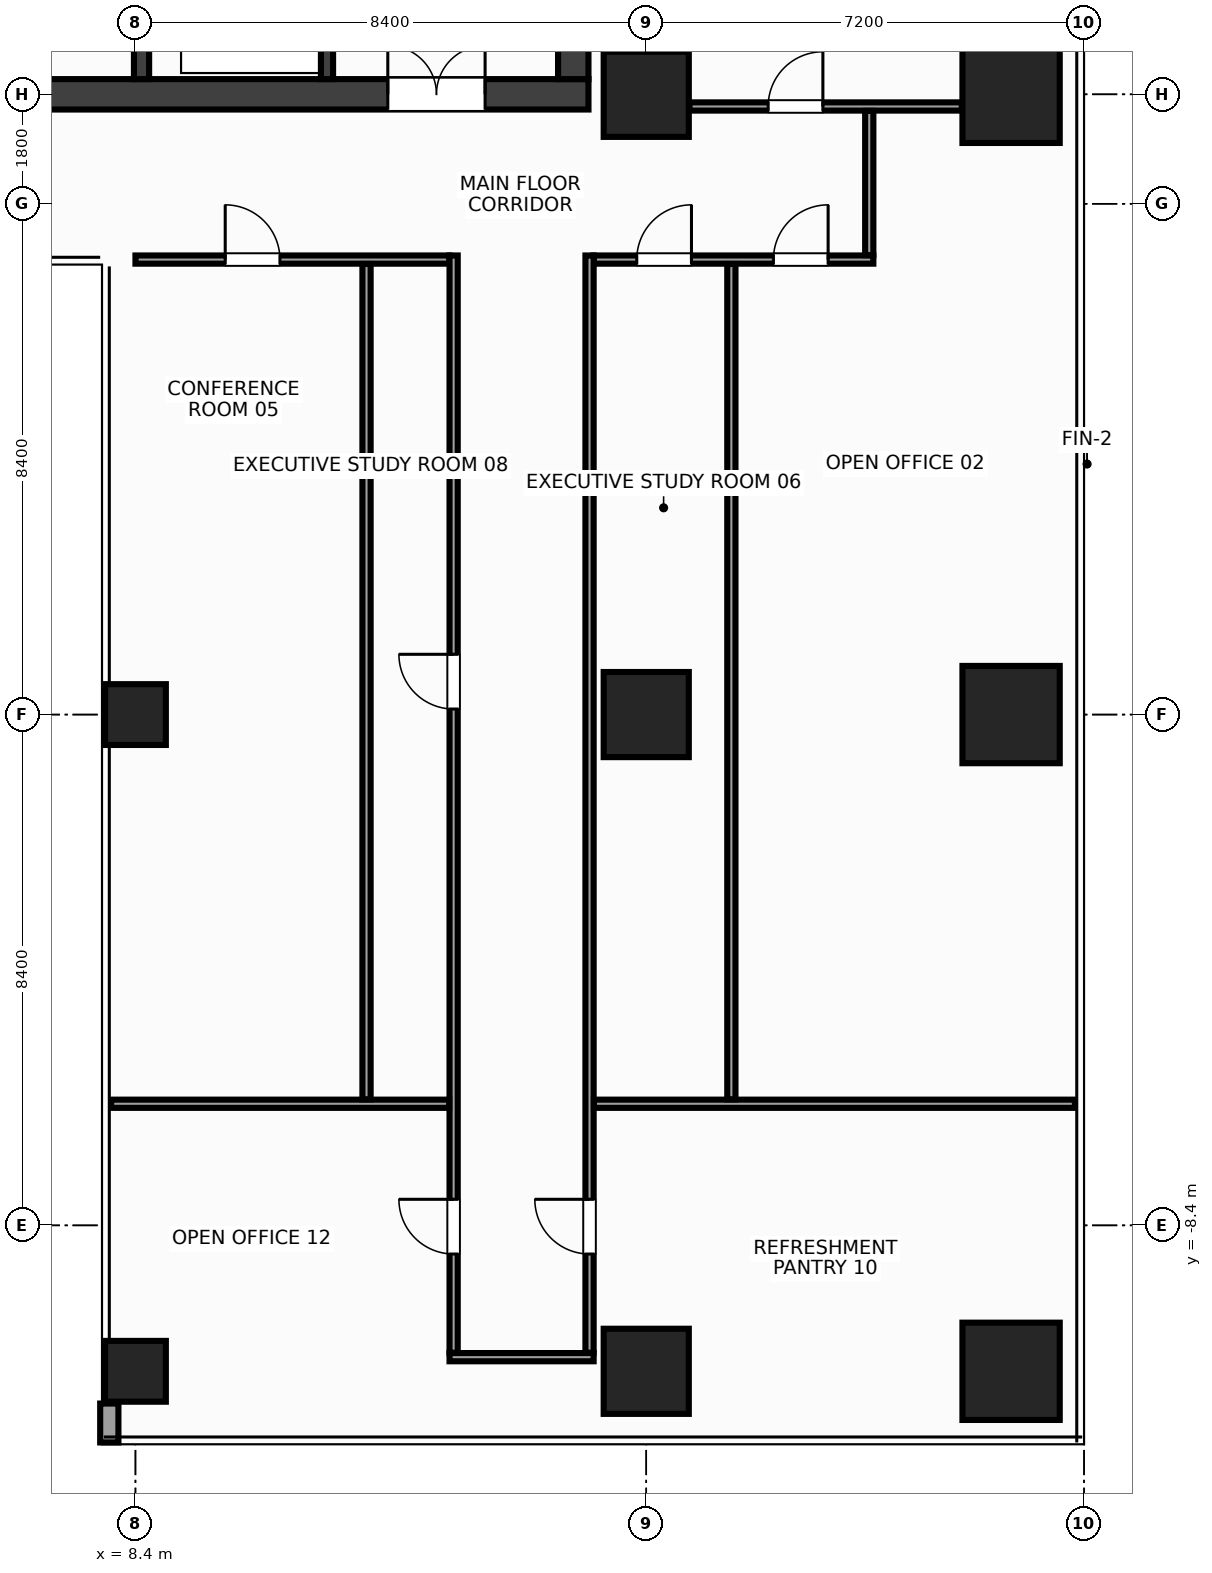
"""IFC4 building model, lengths in metres.
Left out: names, types, materials, properties, quantities, classifications, styles, units other than length and angle.
Written with IfcOpenShell. Run it as: python <this file> out.ifc"""

import sys

from ifc_helpers import new_model, si_unit, direction, frame, frame_2d, origin, origin_2d, place, context, subcontext, project, spatial, rectangle, hollow_rectangle, extrude, source, transform, mapped, element, fill, save


model = new_model("IFC4")
c1 = context("Model", 3, precision=1e-05, world=origin(), true_north=direction((0.0, 1.0)))
c2 = subcontext(c1, "Body", "Model", "MODEL_VIEW")
j1 = project(units=[si_unit("LENGTHUNIT", "METRE"), si_unit("PLANEANGLEUNIT", "RADIAN")], contexts=[c1])
p1 = place(None, origin())
s1 = spatial("IfcSite", under=j1, at=p1, CompositionType="ELEMENT")
p2 = place(p1, origin())
s2 = spatial("IfcBuilding", under=s1, at=p2, CompositionType="ELEMENT")
p3 = place(p2, frame((0.0, 0.0, 203.6)))
s3 = spatial("IfcBuildingStorey", under=s2, at=p3, CompositionType="ELEMENT", Elevation=203.6)
m1 = source(origin(), c2, "Body", "SweptSolid", [
    extrude(rectangle(XDim=31.7, YDim=0.5, at=frame_2d((15.85, 0.0))), origin(), (0.0, 0.0, 1.0), 3.6),
])
p4 = place(p3, frame((-15.85, 10.2, 0.0), z_axis=(0.0, 0.0, 1.0), x_axis=(1.0, 0.0, 0.0)))
e1 = element("IfcWall", 1, at=p4, inside=s3, PredefinedType="SHEAR", context=c2, shape_type="MappedRepresentation", body=[
    mapped(m1, transform((0.0, 0.0, 0.0), x_axis=(1.0, 0.0, 0.0), y_axis=(0.0, 1.0, 0.0), z_axis=(0.0, 0.0, 1.0), scale=1.0)),
])
p5 = place(p4, frame((1.7, 0.0, 0.0)))
e2 = element("IfcOpeningElement", 2, at=p5, cuts=e1, PredefinedType="OPENING", context=c2, shape_type="SweptSolid", body=[
    extrude(rectangle(XDim=1.6, YDim=2.15, at=frame_2d((0.8, 1.075))), frame((0.0, 0.262, 0.0), z_axis=(0.0, -1.0, 0.0), x_axis=(1.0, 0.0, 0.0)), (0.0, 0.0, 1.0), 0.524),
])
p6 = place(p4, frame((28.4, 0.0, 0.0)))
e3 = element("IfcOpeningElement", 3, at=p6, cuts=e1, PredefinedType="OPENING", context=c2, shape_type="SweptSolid", body=[
    extrude(rectangle(XDim=1.6, YDim=2.15, at=frame_2d((0.8, 1.075))), frame((0.0, 0.262, 0.0), z_axis=(0.0, -1.0, 0.0), x_axis=(1.0, 0.0, 0.0)), (0.0, 0.0, 1.0), 0.524),
])
p7 = place(p4, frame((15.1, 0.0, 0.0)))
e4 = element("IfcOpeningElement", 4, at=p7, cuts=e1, PredefinedType="OPENING", context=c2, shape_type="SweptSolid", body=[
    extrude(rectangle(XDim=1.5, YDim=2.2, at=frame_2d((0.75, 1.1))), frame((0.0, 0.262, 0.0), z_axis=(0.0, -1.0, 0.0), x_axis=(1.0, 0.0, 0.0)), (0.0, 0.0, 1.0), 0.524),
])
m2 = source(origin(), c2, "Body", "SweptSolid", [
    extrude(rectangle(XDim=13.1, YDim=0.5, at=frame_2d((6.55, 0.0))), origin(), (0.0, 0.0, 1.0), 3.6),
])
p8 = place(p3, frame((15.6, 10.45, 0.0), z_axis=(0.0, 0.0, 1.0), x_axis=(0.0, 1.0, 0.0)))
e5 = element("IfcWall", 5, at=p8, inside=s3, PredefinedType="SHEAR", context=c2, shape_type="MappedRepresentation", body=[
    mapped(m2, transform((0.0, 0.0, 0.0), x_axis=(1.0, 0.0, 0.0), y_axis=(0.0, 1.0, 0.0), z_axis=(0.0, 0.0, 1.0), scale=1.0)),
])
m3 = source(origin(), c2, "Body", "SweptSolid", [
    extrude(rectangle(XDim=13.1, YDim=0.25, at=frame_2d((6.55, 0.0))), origin(), (0.0, 0.0, 1.0), 3.6),
])
p9 = place(p3, frame((8.5, 10.45, 0.0), z_axis=(0.0, 0.0, 1.0), x_axis=(0.0, 1.0, 0.0)))
e6 = element("IfcWall", 6, at=p9, inside=s3, PredefinedType="SHEAR", context=c2, shape_type="MappedRepresentation", body=[
    mapped(m3, transform((0.0, 0.0, 0.0), x_axis=(1.0, 0.0, 0.0), y_axis=(0.0, 1.0, 0.0), z_axis=(0.0, 0.0, 1.0), scale=1.0)),
])
p10 = place(p9, frame((10.0, 0.0, 0.0)))
e7 = element("IfcOpeningElement", 7, at=p10, cuts=e6, PredefinedType="OPENING", context=c2, shape_type="SweptSolid", body=[
    extrude(rectangle(XDim=0.95, YDim=2.15, at=frame_2d((0.475, 1.075))), frame((0.0, 0.137, 0.0), z_axis=(0.0, -1.0, 0.0), x_axis=(1.0, 0.0, 0.0)), (0.0, 0.0, 1.0), 0.274),
])
m4 = source(origin(), c2, "Body", "SweptSolid", [
    extrude(rectangle(XDim=3.2, YDim=0.2, at=frame_2d((1.6, 0.0))), origin(), (0.0, 0.0, 1.0), 3.6),
])
p11 = place(p3, frame((11.55, 10.45, 0.0), z_axis=(0.0, 0.0, 1.0), x_axis=(0.0, 1.0, 0.0)))
e8 = element("IfcWall", 8, at=p11, inside=s3, PredefinedType="SHEAR", context=c2, shape_type="MappedRepresentation", body=[
    mapped(m4, transform((0.0, 0.0, 0.0), x_axis=(1.0, 0.0, 0.0), y_axis=(0.0, 1.0, 0.0), z_axis=(0.0, 0.0, 1.0), scale=1.0)),
])
p12 = place(p11, frame((0.9, 0.0, 0.0)))
e9 = element("IfcOpeningElement", 9, at=p12, cuts=e8, PredefinedType="OPENING", context=c2, shape_type="SweptSolid", body=[
    extrude(rectangle(XDim=1.1, YDim=2.15, at=frame_2d((0.55, 1.075))), frame((0.0, 0.112, 0.0), z_axis=(0.0, -1.0, 0.0), x_axis=(1.0, 0.0, 0.0)), (0.0, 0.0, 1.0), 0.224),
])
m5 = source(origin(), c2, "Body", "SweptSolid", [
    extrude(rectangle(XDim=1.4, YDim=1.4, at=origin_2d()), origin(), (0.0, 0.0, 1.0), 3.6),
])
for number, where, z_axis, x_axis in (
    (10, (16.8, -10.8, 0.0), (0.0, 0.0, 1.0), (1.0, 0.0, 0.0)),
    (11, (16.8, 0.0, 0.0), (0.0, 0.0, 1.0), (1.0, 0.0, 0.0)),
    (12, (16.8, 10.2, 0.0), (0.0, 0.0, 1.0), (1.0, 0.0, 0.0)),
):
    element("IfcColumn", number, at=place(p3, frame(where, z_axis=z_axis, x_axis=x_axis)), inside=s3, PredefinedType="COLUMN", context=c2, shape_type="MappedRepresentation", body=[
        mapped(m5, transform((0.0, 0.0, 0.0), x_axis=(1.0, 0.0, 0.0), y_axis=(0.0, 1.0, 0.0), z_axis=(0.0, 0.0, 1.0), scale=1.0)),
    ])
m6 = source(origin(), c2, "Body", "SweptSolid", [
    extrude(rectangle(XDim=1.6, YDim=1.6, at=origin_2d()), origin(), (0.0, 0.0, 1.0), 3.6),
])
for number, where, z_axis, x_axis in (
    (13, (22.8, -10.8, 0.0), (0.0, 0.0, 1.0), (1.0, 0.0, 0.0)),
    (14, (22.8, 0.0, 0.0), (0.0, 0.0, 1.0), (1.0, 0.0, 0.0)),
    (15, (22.8, 10.2, 0.0), (0.0, 0.0, 1.0), (1.0, 0.0, 0.0)),
):
    element("IfcColumn", number, at=place(p3, frame(where, z_axis=z_axis, x_axis=x_axis)), inside=s3, PredefinedType="COLUMN", context=c2, shape_type="MappedRepresentation", body=[
        mapped(m6, transform((0.0, 0.0, 0.0), x_axis=(1.0, 0.0, 0.0), y_axis=(0.0, 1.0, 0.0), z_axis=(0.0, 0.0, 1.0), scale=1.0)),
    ])
m7 = source(origin(), c2, "Body", "SweptSolid", [
    extrude(hollow_rectangle(XDim=1.0, YDim=1.0, WallThickness=0.045, at=origin_2d()), origin(), (0.0, 0.0, 1.0), 3.6),
])
for number, where, z_axis, x_axis in (
    (16, (8.4, 0.0, 0.0), (0.0, 0.0, 1.0), (1.0, 0.0, 0.0)),
    (17, (8.4, -10.8, 0.0), (0.0, 0.0, 1.0), (1.0, 0.0, 0.0)),
):
    element("IfcColumn", number, at=place(p3, frame(where, z_axis=z_axis, x_axis=x_axis)), inside=s3, PredefinedType="COLUMN", context=c2, shape_type="MappedRepresentation", body=[
        mapped(m7, transform((0.0, 0.0, 0.0), x_axis=(1.0, 0.0, 0.0), y_axis=(0.0, 1.0, 0.0), z_axis=(0.0, 0.0, 1.0), scale=1.0)),
    ])
m8 = source(origin(), c2, "Body", "SweptSolid", [
    extrude(rectangle(XDim=0.64, YDim=0.24, at=frame_2d((0.32, 0.0))), origin(), (0.0, 0.0, 1.0), 2.76),
])
p13 = place(p3, frame((7.97, -11.33, 0.0), z_axis=(0.0, 0.0, 1.0), x_axis=(0.0, -1.0, 0.0)))
e18 = element("IfcWall", 18, at=p13, inside=s3, PredefinedType="STANDARD", context=c2, shape_type="MappedRepresentation", body=[
    mapped(m8, transform((0.0, 0.0, 0.0), x_axis=(1.0, 0.0, 0.0), y_axis=(0.0, 1.0, 0.0), z_axis=(0.0, 0.0, 1.0), scale=1.0)),
])
m9 = source(origin(), c2, "Body", "SweptSolid", [
    extrude(rectangle(XDim=4.48, YDim=0.135, at=frame_2d((2.24, 0.0))), origin(), (0.0, 0.0, 1.0), 2.915),
])
p14 = place(p3, frame((17.51, 10.0, 0.0), z_axis=(0.0, 0.0, 1.0), x_axis=(1.0, 0.0, 0.0)))
e19 = element("IfcWall", 19, at=p14, inside=s3, PredefinedType="PARTITIONING", context=c2, shape_type="MappedRepresentation", body=[
    mapped(m9, transform((0.0, 0.0, 0.0), x_axis=(1.0, 0.0, 0.0), y_axis=(0.0, 1.0, 0.0), z_axis=(0.0, 0.0, 1.0), scale=1.0)),
])
p15 = place(p14, frame((1.295, 0.0, 0.0)))
e20 = element("IfcOpeningElement", 20, at=p15, cuts=e19, PredefinedType="OPENING", context=c2, shape_type="SweptSolid", body=[
    extrude(rectangle(XDim=0.9, YDim=2.15, at=frame_2d((0.45, 1.075))), frame((0.0, 0.08, 0.0), z_axis=(0.0, -1.0, 0.0), x_axis=(1.0, 0.0, 0.0)), (0.0, 0.0, 1.0), 0.159),
])
m10 = source(origin(), c2, "Body", "SweptSolid", [
    extrude(rectangle(XDim=5.165, YDim=0.135, at=frame_2d((2.583, 0.0))), origin(), (0.0, 0.0, 1.0), 3.38),
])
p16 = place(p3, frame((8.4, 7.482, 0.0), z_axis=(0.0, 0.0, 1.0), x_axis=(1.0, 0.0, 0.0)))
e21 = element("IfcWall", 21, at=p16, inside=s3, PredefinedType="PARTITIONING", context=c2, shape_type="MappedRepresentation", body=[
    mapped(m10, transform((0.0, 0.0, 0.0), x_axis=(1.0, 0.0, 0.0), y_axis=(0.0, 1.0, 0.0), z_axis=(0.0, 0.0, 1.0), scale=1.0)),
])
p17 = place(p16, frame((1.476, 0.0, 0.0)))
e22 = element("IfcOpeningElement", 22, at=p17, cuts=e21, PredefinedType="OPENING", context=c2, shape_type="SweptSolid", body=[
    extrude(rectangle(XDim=0.9, YDim=2.15, at=frame_2d((0.45, 1.075))), frame((0.0, 0.08, 0.0), z_axis=(0.0, -1.0, 0.0), x_axis=(1.0, 0.0, 0.0)), (0.0, 0.0, 1.0), 0.159),
])
m11 = source(origin(), c2, "Body", "SweptSolid", [
    extrude(rectangle(XDim=4.6, YDim=0.135, at=frame_2d((2.3, 0.0))), origin(), (0.0, 0.0, 1.0), 2.765),
])
p18 = place(p3, frame((15.935, 7.482, 0.0), z_axis=(0.0, 0.0, 1.0), x_axis=(1.0, 0.0, 0.0)))
e23 = element("IfcWall", 23, at=p18, inside=s3, PredefinedType="PARTITIONING", context=c2, shape_type="MappedRepresentation", body=[
    mapped(m11, transform((0.0, 0.0, 0.0), x_axis=(1.0, 0.0, 0.0), y_axis=(0.0, 1.0, 0.0), z_axis=(0.0, 0.0, 1.0), scale=1.0)),
])
p19 = place(p18, frame((2.956, 0.0, 0.0)))
e24 = element("IfcOpeningElement", 24, at=p19, cuts=e23, PredefinedType="OPENING", context=c2, shape_type="SweptSolid", body=[
    extrude(rectangle(XDim=0.9, YDim=2.15, at=frame_2d((0.45, 1.075))), frame((0.0, 0.08, 0.0), z_axis=(0.0, -1.0, 0.0), x_axis=(1.0, 0.0, 0.0)), (0.0, 0.0, 1.0), 0.159),
])
p20 = place(p18, frame((0.709, 0.0, 0.0)))
e25 = element("IfcOpeningElement", 25, at=p20, cuts=e23, PredefinedType="OPENING", context=c2, shape_type="SweptSolid", body=[
    extrude(rectangle(XDim=0.9, YDim=2.15, at=frame_2d((0.45, 1.075))), frame((0.0, 0.08, 0.0), z_axis=(0.0, -1.0, 0.0), x_axis=(1.0, 0.0, 0.0)), (0.0, 0.0, 1.0), 0.159),
])
m12 = source(origin(), c2, "Body", "SweptSolid", [
    extrude(rectangle(XDim=2.37, YDim=0.135, at=frame_2d((1.185, 0.0))), origin(), (0.0, 0.0, 1.0), 3.38),
])
p21 = place(p3, frame((13.565, -10.567, 0.0), z_axis=(0.0, 0.0, 1.0), x_axis=(1.0, 0.0, 0.0)))
e26 = element("IfcWall", 26, at=p21, inside=s3, PredefinedType="PARTITIONING", context=c2, shape_type="MappedRepresentation", body=[
    mapped(m12, transform((0.0, 0.0, 0.0), x_axis=(1.0, 0.0, 0.0), y_axis=(0.0, 1.0, 0.0), z_axis=(0.0, 0.0, 1.0), scale=1.0)),
])
m13 = source(origin(), c2, "Body", "SweptSolid", [
    extrude(rectangle(XDim=2.373, YDim=0.135, at=frame_2d((1.186, 0.0))), origin(), (0.0, 0.0, 1.0), 3.38),
])
p22 = place(p3, frame((20.468, 7.555, 0.0), z_axis=(0.0, 0.0, 1.0), x_axis=(0.0, 1.0, 0.0)))
e27 = element("IfcWall", 27, at=p22, inside=s3, PredefinedType="PARTITIONING", context=c2, shape_type="MappedRepresentation", body=[
    mapped(m13, transform((0.0, 0.0, 0.0), x_axis=(1.0, 0.0, 0.0), y_axis=(0.0, 1.0, 0.0), z_axis=(0.0, 0.0, 1.0), scale=1.0)),
])
m14 = source(origin(), c2, "Body", "SweptSolid", [
    extrude(rectangle(XDim=18.045, YDim=0.135, at=frame_2d((9.022, 0.0))), origin(), (0.0, 0.0, 1.0), 2.915),
])
p23 = place(p3, frame((13.633, -10.495, 0.0), z_axis=(0.0, 0.0, 1.0), x_axis=(0.0, 1.0, 0.0)))
e28 = element("IfcWall", 28, at=p23, inside=s3, PredefinedType="PARTITIONING", context=c2, shape_type="MappedRepresentation", body=[
    mapped(m14, transform((0.0, 0.0, 0.0), x_axis=(1.0, 0.0, 0.0), y_axis=(0.0, 1.0, 0.0), z_axis=(0.0, 0.0, 1.0), scale=1.0)),
])
p24 = place(p23, frame((10.586, 0.0, 0.0)))
e29 = element("IfcOpeningElement", 29, at=p24, cuts=e28, PredefinedType="OPENING", context=c2, shape_type="SweptSolid", body=[
    extrude(rectangle(XDim=0.9, YDim=2.15, at=frame_2d((0.45, 1.075))), frame((0.0, 0.08, 0.0), z_axis=(0.0, -1.0, 0.0), x_axis=(1.0, 0.0, 0.0)), (0.0, 0.0, 1.0), 0.159),
])
p25 = place(p23, frame((1.624, 0.0, 0.0)))
e30 = element("IfcOpeningElement", 30, at=p25, cuts=e28, PredefinedType="OPENING", context=c2, shape_type="SweptSolid", body=[
    extrude(rectangle(XDim=0.9, YDim=2.15, at=frame_2d((0.45, 1.075))), frame((0.0, 0.08, 0.0), z_axis=(0.0, -1.0, 0.0), x_axis=(1.0, 0.0, 0.0)), (0.0, 0.0, 1.0), 0.159),
])
p26 = place(p3, frame((15.867, -10.495, 0.0), z_axis=(0.0, 0.0, 1.0), x_axis=(0.0, 1.0, 0.0)))
e31 = element("IfcWall", 31, at=p26, inside=s3, PredefinedType="PARTITIONING", context=c2, shape_type="MappedRepresentation", body=[
    mapped(m14, transform((0.0, 0.0, 0.0), x_axis=(1.0, 0.0, 0.0), y_axis=(0.0, 1.0, 0.0), z_axis=(0.0, 0.0, 1.0), scale=1.0)),
])
p27 = place(p26, frame((1.624, 0.0, 0.0)))
e32 = element("IfcOpeningElement", 32, at=p27, cuts=e31, PredefinedType="OPENING", context=c2, shape_type="SweptSolid", body=[
    extrude(rectangle(XDim=0.9, YDim=2.15, at=frame_2d((0.45, 1.075))), frame((0.0, 0.08, 0.0), z_axis=(0.0, -1.0, 0.0), x_axis=(1.0, 0.0, 0.0)), (0.0, 0.0, 1.0), 0.159),
])
m15 = source(origin(), c2, "Body", "SweptSolid", [
    extrude(rectangle(XDim=5.56, YDim=0.135, at=frame_2d((2.78, 0.0))), origin(), (0.0, 0.0, 1.0), 2.765),
])
p28 = place(p3, frame((8.0, -6.4, 0.0), z_axis=(0.0, 0.0, 1.0), x_axis=(1.0, 0.0, 0.0)))
e33 = element("IfcWall", 33, at=p28, inside=s3, PredefinedType="PARTITIONING", context=c2, shape_type="MappedRepresentation", body=[
    mapped(m15, transform((0.0, 0.0, 0.0), x_axis=(1.0, 0.0, 0.0), y_axis=(0.0, 1.0, 0.0), z_axis=(0.0, 0.0, 1.0), scale=1.0)),
])
m16 = source(origin(), c2, "Body", "SweptSolid", [
    extrude(rectangle(XDim=7.91, YDim=0.135, at=frame_2d((3.955, 0.0))), origin(), (0.0, 0.0, 1.0), 2.765),
])
p29 = place(p3, frame((15.94, -6.4, 0.0), z_axis=(0.0, 0.0, 1.0), x_axis=(1.0, 0.0, 0.0)))
e34 = element("IfcWall", 34, at=p29, inside=s3, PredefinedType="PARTITIONING", context=c2, shape_type="MappedRepresentation", body=[
    mapped(m16, transform((0.0, 0.0, 0.0), x_axis=(1.0, 0.0, 0.0), y_axis=(0.0, 1.0, 0.0), z_axis=(0.0, 0.0, 1.0), scale=1.0)),
])
m17 = source(origin(), c2, "Body", "SweptSolid", [
    extrude(rectangle(XDim=13.737, YDim=0.135, at=frame_2d((6.869, 0.0))), origin(), (0.0, 0.0, 1.0), 2.915),
])
for number, where, z_axis, x_axis in (
    (35, (12.2, -6.327, 0.0), (0.0, 0.0, 1.0), (0.0, 1.0, 0.0)),
    (36, (18.2, -6.327, 0.0), (0.0, 0.0, 1.0), (0.0, 1.0, 0.0)),
):
    element("IfcWall", number, at=place(p3, frame(where, z_axis=z_axis, x_axis=x_axis)), inside=s3, PredefinedType="PARTITIONING", context=c2, shape_type="MappedRepresentation", body=[
        mapped(m17, transform((0.0, 0.0, 0.0), x_axis=(1.0, 0.0, 0.0), y_axis=(0.0, 1.0, 0.0), z_axis=(0.0, 0.0, 1.0), scale=1.0)),
    ])
m18 = source(origin(), c2, "Body", "SweptSolid", [
    extrude(rectangle(XDim=1.6, YDim=2.15, at=frame_2d((0.8, 1.075))), frame((0.0, 0.025, 0.0), z_axis=(0.0, -1.0, 0.0), x_axis=(1.0, 0.0, 0.0)), (0.0, 0.0, 1.0), 0.05),
])
p30 = place(p6, origin())
e37 = element("IfcDoor", 37, at=p30, inside=s3, OperationType="DOUBLE_DOOR_SINGLE_SWING", PredefinedType="DOOR", context=c2, shape_type="MappedRepresentation", body=[
    mapped(m18, transform((0.0, 0.0, 0.0), x_axis=(1.0, 0.0, 0.0), y_axis=(0.0, 1.0, 0.0), z_axis=(0.0, 0.0, 1.0), scale=1.0)),
])
fill(e3, e37)
m19 = source(origin(), c2, "Body", "SweptSolid", [
    extrude(rectangle(XDim=0.9, YDim=2.15, at=frame_2d((0.45, 1.075))), frame((0.0, 0.025, 0.0), z_axis=(0.0, -1.0, 0.0), x_axis=(1.0, 0.0, 0.0)), (0.0, 0.0, 1.0), 0.05),
])
p31 = place(p15, origin())
e38 = element("IfcDoor", 38, at=p31, inside=s3, OperationType="SINGLE_SWING_RIGHT", PredefinedType="DOOR", context=c2, shape_type="MappedRepresentation", body=[
    mapped(m19, transform((0.0, 0.0, 0.0), x_axis=(1.0, 0.0, 0.0), y_axis=(0.0, 1.0, 0.0), z_axis=(0.0, 0.0, 1.0), scale=1.0)),
])
fill(e20, e38)
p32 = place(p19, origin())
e39 = element("IfcDoor", 39, at=p32, inside=s3, OperationType="SINGLE_SWING_RIGHT", PredefinedType="DOOR", context=c2, shape_type="MappedRepresentation", body=[
    mapped(m19, transform((0.0, 0.0, 0.0), x_axis=(1.0, 0.0, 0.0), y_axis=(0.0, 1.0, 0.0), z_axis=(0.0, 0.0, 1.0), scale=1.0)),
])
fill(e24, e39)
p33 = place(p17, origin())
e40 = element("IfcDoor", 40, at=p33, inside=s3, OperationType="SINGLE_SWING_LEFT", PredefinedType="DOOR", context=c2, shape_type="MappedRepresentation", body=[
    mapped(m19, transform((0.0, 0.0, 0.0), x_axis=(1.0, 0.0, 0.0), y_axis=(0.0, 1.0, 0.0), z_axis=(0.0, 0.0, 1.0), scale=1.0)),
])
fill(e22, e40)
p34 = place(p20, origin())
e41 = element("IfcDoor", 41, at=p34, inside=s3, OperationType="SINGLE_SWING_RIGHT", PredefinedType="DOOR", context=c2, shape_type="MappedRepresentation", body=[
    mapped(m19, transform((0.0, 0.0, 0.0), x_axis=(1.0, 0.0, 0.0), y_axis=(0.0, 1.0, 0.0), z_axis=(0.0, 0.0, 1.0), scale=1.0)),
])
fill(e25, e41)
p35 = place(p24, origin())
e42 = element("IfcDoor", 42, at=p35, inside=s3, OperationType="SINGLE_SWING_RIGHT", PredefinedType="DOOR", context=c2, shape_type="MappedRepresentation", body=[
    mapped(m19, transform((0.0, 0.0, 0.0), x_axis=(1.0, 0.0, 0.0), y_axis=(0.0, 1.0, 0.0), z_axis=(0.0, 0.0, 1.0), scale=1.0)),
])
fill(e29, e42)
p36 = place(p27, origin())
e43 = element("IfcDoor", 43, at=p36, inside=s3, OperationType="SINGLE_SWING_RIGHT", PredefinedType="DOOR", context=c2, shape_type="MappedRepresentation", body=[
    mapped(m19, transform((0.0, 0.0, 0.0), x_axis=(1.0, 0.0, 0.0), y_axis=(0.0, 1.0, 0.0), z_axis=(0.0, 0.0, 1.0), scale=1.0)),
])
fill(e32, e43)
p37 = place(p25, origin())
e44 = element("IfcDoor", 44, at=p37, inside=s3, OperationType="SINGLE_SWING_RIGHT", PredefinedType="DOOR", context=c2, shape_type="MappedRepresentation", body=[
    mapped(m19, transform((0.0, 0.0, 0.0), x_axis=(1.0, 0.0, 0.0), y_axis=(0.0, 1.0, 0.0), z_axis=(0.0, 0.0, 1.0), scale=1.0)),
])
fill(e30, e44)
save(model, sys.argv[1])
